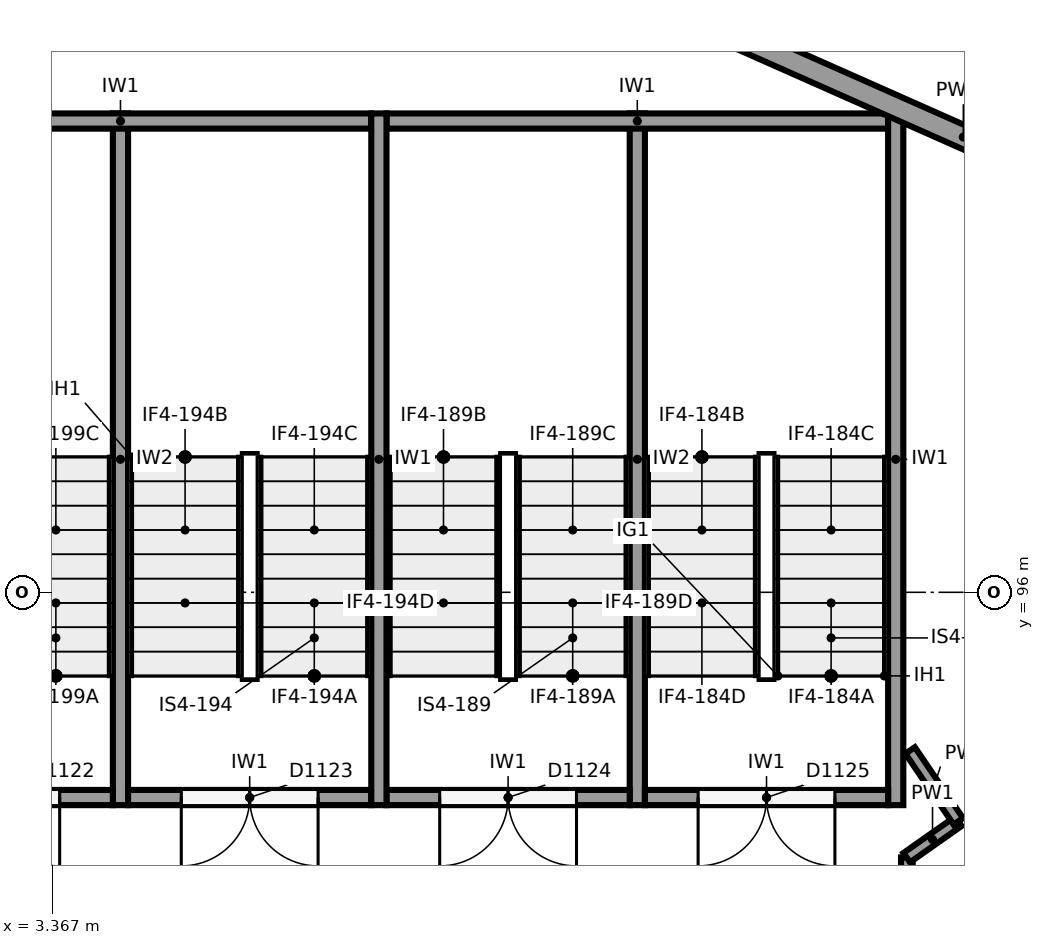
"""IFC4 building model, lengths in metres.
Left out: names, types, materials, properties, quantities, classifications, styles, units other than length and angle.
Written with IfcOpenShell. Run it as: python <this file> out.ifc"""

import sys

from ifc_helpers import new_model, si_unit, direction, frame, frame_2d, origin, place, context, subcontext, project, spatial, rectangle, extrude, element, fill, save


model = new_model("IFC4")
c1 = context("Model", 3, precision=1e-05, world=origin(), true_north=direction((0.0, 1.0)))
c2 = subcontext(c1, "Body", "Model", "MODEL_VIEW")
j1 = project(units=[si_unit("LENGTHUNIT", "METRE"), si_unit("PLANEANGLEUNIT", "RADIAN")], contexts=[c1])
p1 = place(None, origin())
s1 = spatial("IfcSite", under=j1, at=p1, CompositionType="ELEMENT")
p2 = place(p1, origin())
s2 = spatial("IfcBuilding", under=s1, at=p2, CompositionType="ELEMENT")
p3 = place(p2, frame((0.0, 0.0, 12.0)))
s3 = spatial("IfcBuildingStorey", under=s2, at=p3, CompositionType="ELEMENT", Elevation=12.0)
p4 = place(p3, frame((8.123, 105.198, 0.0), z_axis=(0.0, 0.0, 1.0), x_axis=(0.914138897099, -0.405401130748, 0.0)))
e1 = element("IfcWall", 1, at=p4, inside=s3, PredefinedType="SOLIDWALL", context=c2, shape_type="SweptSolid", body=[
    extrude(rectangle(XDim=15.824, YDim=0.3, at=frame_2d((7.912, 0.0))), origin(), (0.0, 0.0, 1.0), 4.35),
])
p5 = place(p4, frame((11.574, 0.0, 0.0)))
e2 = element("IfcOpeningElement", 2, at=p5, cuts=e1, PredefinedType="OPENING", context=c2, shape_type="SweptSolid", body=[
    extrude(rectangle(XDim=1.8, YDim=2.4, at=frame_2d((0.9, 1.2))), frame((0.0, 0.16, 0.0), z_axis=(0.0, -1.0, 0.0), x_axis=(1.0, 0.0, 0.0)), (0.0, 0.0, 1.0), 0.32),
])
p6 = place(p3, frame((-7.256, 98.782, 0.0), z_axis=(0.0, 0.0, 1.0), x_axis=(0.914136361455, 0.405406848322, 0.0)))
e3 = element("IfcWall", 3, at=p6, inside=s3, PredefinedType="SOLIDWALL", context=c2, shape_type="SweptSolid", body=[
    extrude(rectangle(XDim=15.824, YDim=0.35, at=frame_2d((7.912, 0.0))), origin(), (0.0, 0.0, 1.0), 4.35),
])
p7 = place(p6, frame((0.75, 0.0, 1.0)))
e4 = element("IfcOpeningElement", 4, at=p7, cuts=e3, PredefinedType="OPENING", context=c2, shape_type="SweptSolid", body=[
    extrude(rectangle(XDim=0.9, YDim=3.25, at=frame_2d((0.45, 1.625))), frame((0.0, 0.185, 0.0), z_axis=(0.0, -1.0, 0.0), x_axis=(1.0, 0.0, 0.0)), (0.0, 0.0, 1.0), 0.37),
])
p8 = place(p6, frame((2.85, 0.0, 1.0)))
e5 = element("IfcOpeningElement", 5, at=p8, cuts=e3, PredefinedType="OPENING", context=c2, shape_type="SweptSolid", body=[
    extrude(rectangle(XDim=0.9, YDim=3.25, at=frame_2d((0.45, 1.625))), frame((0.0, 0.185, 0.0), z_axis=(0.0, -1.0, 0.0), x_axis=(1.0, 0.0, 0.0)), (0.0, 0.0, 1.0), 0.37),
])
p9 = place(p6, frame((4.95, 0.0, 1.0)))
e6 = element("IfcOpeningElement", 6, at=p9, cuts=e3, PredefinedType="OPENING", context=c2, shape_type="SweptSolid", body=[
    extrude(rectangle(XDim=0.9, YDim=3.25, at=frame_2d((0.45, 1.625))), frame((0.0, 0.185, 0.0), z_axis=(0.0, -1.0, 0.0), x_axis=(1.0, 0.0, 0.0)), (0.0, 0.0, 1.0), 0.37),
])
p10 = place(p6, frame((7.05, 0.0, 1.0)))
e7 = element("IfcOpeningElement", 7, at=p10, cuts=e3, PredefinedType="OPENING", context=c2, shape_type="SweptSolid", body=[
    extrude(rectangle(XDim=0.9, YDim=3.25, at=frame_2d((0.45, 1.625))), frame((0.0, 0.185, 0.0), z_axis=(0.0, -1.0, 0.0), x_axis=(1.0, 0.0, 0.0)), (0.0, 0.0, 1.0), 0.37),
])
for number, where, z_axis, x_axis in (
    (8, (14.467, 102.3, 0.0), (0.0, 0.0, 1.0), (0.0, -1.0, 0.0)),
    (9, (7.667, 102.3, 0.0), (0.0, 0.0, 1.0), (0.0, -1.0, 0.0)),
):
    element("IfcWall", number, at=place(p3, frame(where, z_axis=z_axis, x_axis=x_axis)), inside=s3, PredefinedType="SHEAR", context=c2, shape_type="SweptSolid", body=[
        extrude(rectangle(XDim=9.1, YDim=0.2, at=frame_2d((4.55, 0.0))), origin(), (0.0, 0.0, 1.0), 5.65),
    ])
p11 = place(p3, frame((14.367, 102.2, 0.0), z_axis=(0.0, 0.0, 1.0), x_axis=(-1.0, 0.0, 0.0)))
e10 = element("IfcWall", 10, at=p11, inside=s3, PredefinedType="SHEAR", context=c2, shape_type="SweptSolid", body=[
    extrude(rectangle(XDim=6.6, YDim=0.2, at=frame_2d((3.3, 0.0))), origin(), (0.0, 0.0, 1.0), 5.65),
])
p12 = place(p3, frame((7.567, 102.2, 0.0), z_axis=(0.0, 0.0, 1.0), x_axis=(-1.0, 0.0, 0.0)))
e11 = element("IfcWall", 11, at=p12, inside=s3, PredefinedType="SHEAR", context=c2, shape_type="SweptSolid", body=[
    extrude(rectangle(XDim=6.6, YDim=0.2, at=frame_2d((3.3, 0.0))), origin(), (0.0, 0.0, 1.0), 5.65),
])
for number, where, z_axis, x_axis in (
    (12, (11.067, 102.3, 0.0), (0.0, 0.0, 1.0), (0.0, -1.0, 0.0)),
    (13, (4.267, 102.3, 0.0), (0.0, 0.0, 1.0), (0.0, -1.0, 0.0)),
):
    element("IfcWall", number, at=place(p3, frame(where, z_axis=z_axis, x_axis=x_axis)), inside=s3, PredefinedType="SHEAR", context=c2, shape_type="SweptSolid", body=[
        extrude(rectangle(XDim=9.1, YDim=0.2, at=frame_2d((4.55, 0.0))), origin(), (0.0, 0.0, 1.0), 5.65),
    ])
p13 = place(p3, frame((14.367, 93.3, 0.0), z_axis=(0.0, 0.0, 1.0), x_axis=(-1.0, 0.0, 0.0)))
e14 = element("IfcWall", 14, at=p13, inside=s3, PredefinedType="SHEAR", context=c2, shape_type="SweptSolid", body=[
    extrude(rectangle(XDim=3.2, YDim=0.2, at=frame_2d((1.6, 0.0))), origin(), (0.0, 0.0, 1.0), 5.65),
])
p14 = place(p13, frame((0.7, 0.0, 0.0)))
e15 = element("IfcOpeningElement", 15, at=p14, cuts=e14, PredefinedType="OPENING", context=c2, shape_type="SweptSolid", body=[
    extrude(rectangle(XDim=1.8, YDim=2.1, at=frame_2d((0.9, 1.05))), frame((0.0, 0.11, 0.0), z_axis=(0.0, -1.0, 0.0), x_axis=(1.0, 0.0, 0.0)), (0.0, 0.0, 1.0), 0.22),
])
p15 = place(p3, frame((10.967, 93.3, 0.0), z_axis=(0.0, 0.0, 1.0), x_axis=(-1.0, 0.0, 0.0)))
e16 = element("IfcWall", 16, at=p15, inside=s3, PredefinedType="SHEAR", context=c2, shape_type="SweptSolid", body=[
    extrude(rectangle(XDim=3.2, YDim=0.2, at=frame_2d((1.6, 0.0))), origin(), (0.0, 0.0, 1.0), 5.65),
])
p16 = place(p15, frame((0.7, 0.0, 0.0)))
e17 = element("IfcOpeningElement", 17, at=p16, cuts=e16, PredefinedType="OPENING", context=c2, shape_type="SweptSolid", body=[
    extrude(rectangle(XDim=1.8, YDim=2.1, at=frame_2d((0.9, 1.05))), frame((0.0, 0.11, 0.0), z_axis=(0.0, -1.0, 0.0), x_axis=(1.0, 0.0, 0.0)), (0.0, 0.0, 1.0), 0.22),
])
p17 = place(p3, frame((7.567, 93.3, 0.0), z_axis=(0.0, 0.0, 1.0), x_axis=(-1.0, 0.0, 0.0)))
e18 = element("IfcWall", 18, at=p17, inside=s3, PredefinedType="SHEAR", context=c2, shape_type="SweptSolid", body=[
    extrude(rectangle(XDim=3.2, YDim=0.2, at=frame_2d((1.6, 0.0))), origin(), (0.0, 0.0, 1.0), 5.65),
])
p18 = place(p17, frame((0.7, 0.0, 0.0)))
e19 = element("IfcOpeningElement", 19, at=p18, cuts=e18, PredefinedType="OPENING", context=c2, shape_type="SweptSolid", body=[
    extrude(rectangle(XDim=1.8, YDim=2.1, at=frame_2d((0.9, 1.05))), frame((0.0, 0.11, 0.0), z_axis=(0.0, -1.0, 0.0), x_axis=(1.0, 0.0, 0.0)), (0.0, 0.0, 1.0), 0.22),
])
p19 = place(p3, frame((4.167, 93.3, 0.0), z_axis=(0.0, 0.0, 1.0), x_axis=(-1.0, 0.0, 0.0)))
e20 = element("IfcWall", 20, at=p19, inside=s3, PredefinedType="SHEAR", context=c2, shape_type="SweptSolid", body=[
    extrude(rectangle(XDim=3.2, YDim=0.2, at=frame_2d((1.6, 0.0))), origin(), (0.0, 0.0, 1.0), 5.65),
])
p20 = place(p19, frame((0.7, 0.0, 0.0)))
e21 = element("IfcOpeningElement", 21, at=p20, cuts=e20, PredefinedType="OPENING", context=c2, shape_type="SweptSolid", body=[
    extrude(rectangle(XDim=1.8, YDim=2.1, at=frame_2d((0.9, 1.05))), frame((0.0, 0.11, 0.0), z_axis=(0.0, -1.0, 0.0), x_axis=(1.0, 0.0, 0.0)), (0.0, 0.0, 1.0), 0.22),
])
p21 = place(p3, frame((14.612, 88.088, 0.0), z_axis=(0.0, 0.0, 1.0), x_axis=(0.0, 1.0, 0.0)))
e22 = element("IfcWall", 22, at=p21, inside=s3, PredefinedType="PARTITIONING", context=c2, shape_type="SweptSolid", body=[
    extrude(rectangle(XDim=4.422, YDim=0.15, at=frame_2d((2.211, 0.0))), origin(), (0.0, 0.0, 1.0), 4.35),
])
p22 = place(p21, frame((0.95, 0.0, 0.0)))
e23 = element("IfcOpeningElement", 23, at=p22, cuts=e22, PredefinedType="OPENING", context=c2, shape_type="SweptSolid", body=[
    extrude(rectangle(XDim=1.8, YDim=2.1, at=frame_2d((0.9, 1.05))), frame((0.0, 0.085, 0.0), z_axis=(0.0, -1.0, 0.0), x_axis=(1.0, 0.0, 0.0)), (0.0, 0.0, 1.0), 0.17),
])
p23 = place(p3, frame((14.612, 90.888, 4.35), z_axis=(0.0, 0.0, 1.0), x_axis=(0.0, 1.0, 0.0)))
e24 = element("IfcWall", 24, at=p23, inside=s3, PredefinedType="PARTITIONING", context=c2, shape_type="SweptSolid", body=[
    extrude(rectangle(XDim=1.622, YDim=0.15, at=frame_2d((0.811, 0.0))), origin(), (0.0, 0.0, 1.0), 1.3),
])
p24 = place(p3, frame((14.612, 92.509, 0.0), z_axis=(0.0, 0.0, 1.0), x_axis=(0.81774999294, 0.575573582652, 0.0)))
e25 = element("IfcWall", 25, at=p24, inside=s3, PredefinedType="PARTITIONING", context=c2, shape_type="SweptSolid", body=[
    extrude(rectangle(XDim=0.83, YDim=0.15, at=frame_2d((0.415, 0.0))), origin(), (0.0, 0.0, 1.0), 5.65),
])
p25 = place(p3, frame((15.29, 92.987, 0.0), z_axis=(0.0, 0.0, 1.0), x_axis=(-0.562120553728, 0.827055308354, 0.0)))
e26 = element("IfcWall", 26, at=p25, inside=s3, PredefinedType="PARTITIONING", context=c2, shape_type="SweptSolid", body=[
    extrude(rectangle(XDim=1.128, YDim=0.15, at=frame_2d((0.564, 0.0))), origin(), (0.0, 0.0, 1.0), 5.65),
])
p26 = place(p14, origin())
e27 = element("IfcDoor", 27, at=p26, inside=s3, OperationType="DOUBLE_DOOR_SINGLE_SWING", PredefinedType="DOOR", context=c2, shape_type="SweptSolid", body=[
    extrude(rectangle(XDim=1.8, YDim=2.1, at=frame_2d((0.9, 1.05))), frame((0.0, 0.025, 0.0), z_axis=(0.0, -1.0, 0.0), x_axis=(1.0, 0.0, 0.0)), (0.0, 0.0, 1.0), 0.05),
])
fill(e15, e27)
p27 = place(p16, origin())
e28 = element("IfcDoor", 28, at=p27, inside=s3, OperationType="DOUBLE_DOOR_SINGLE_SWING", PredefinedType="DOOR", context=c2, shape_type="SweptSolid", body=[
    extrude(rectangle(XDim=1.8, YDim=2.1, at=frame_2d((0.9, 1.05))), frame((0.0, 0.025, 0.0), z_axis=(0.0, -1.0, 0.0), x_axis=(1.0, 0.0, 0.0)), (0.0, 0.0, 1.0), 0.05),
])
fill(e17, e28)
p28 = place(p18, origin())
e29 = element("IfcDoor", 29, at=p28, inside=s3, OperationType="DOUBLE_DOOR_SINGLE_SWING", PredefinedType="DOOR", context=c2, shape_type="SweptSolid", body=[
    extrude(rectangle(XDim=1.8, YDim=2.1, at=frame_2d((0.9, 1.05))), frame((0.0, 0.025, 0.0), z_axis=(0.0, -1.0, 0.0), x_axis=(1.0, 0.0, 0.0)), (0.0, 0.0, 1.0), 0.05),
])
fill(e19, e29)
p29 = place(p20, origin())
e30 = element("IfcDoor", 30, at=p29, inside=s3, OperationType="DOUBLE_DOOR_SINGLE_SWING", PredefinedType="DOOR", context=c2, shape_type="SweptSolid", body=[
    extrude(rectangle(XDim=1.8, YDim=2.1, at=frame_2d((0.9, 1.05))), frame((0.0, 0.025, 0.0), z_axis=(0.0, -1.0, 0.0), x_axis=(1.0, 0.0, 0.0)), (0.0, 0.0, 1.0), 0.05),
])
fill(e21, e30)
save(model, sys.argv[1])
